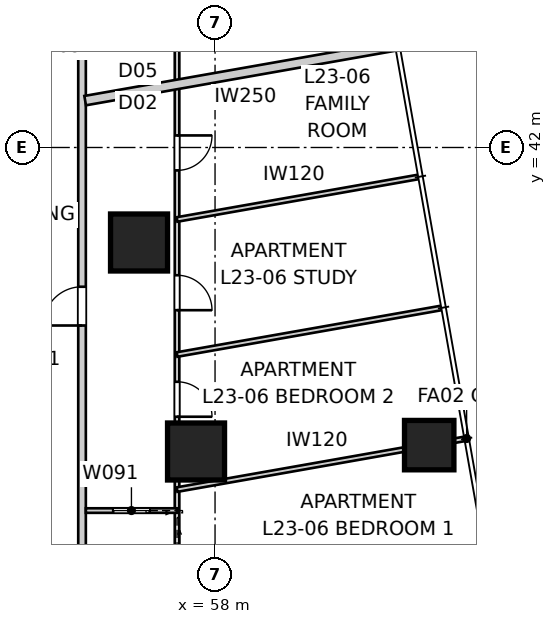
"""IFC4 building model, lengths in metres.
Left out: names, types, materials, properties, quantities, classifications, styles, units other than length and angle.
Written with IfcOpenShell. Run it as: python <this file> out.ifc"""

import sys

from ifc_helpers import new_model, si_unit, direction, frame, frame_2d, origin, origin_2d, place, context, subcontext, project, spatial, rectangle, extrude, element, fill, save


model = new_model("IFC4")
c1 = context("Model", 3, precision=1e-05, world=origin(), true_north=direction((0.0, 1.0)))
c2 = subcontext(c1, "Body", "Model", "MODEL_VIEW")
j1 = project(units=[si_unit("LENGTHUNIT", "METRE"), si_unit("PLANEANGLEUNIT", "RADIAN")], contexts=[c1])
p1 = place(None, origin())
s1 = spatial("IfcSite", under=j1, at=p1, CompositionType="ELEMENT")
p2 = place(p1, origin())
s2 = spatial("IfcBuilding", under=s1, at=p2, CompositionType="ELEMENT")
p3 = place(p2, frame((0.0, 0.0, 86.2)))
s3 = spatial("IfcBuildingStorey", under=s2, at=p3, CompositionType="ELEMENT", Elevation=86.2)
p4 = place(p3, frame((63.635, 34.167, 0.0), z_axis=(0.0, 0.0, 1.0), x_axis=(1.0, 0.0, 0.0)))
e1 = element("IfcColumn", 1, at=p4, inside=s3, PredefinedType="COLUMN", context=c2, shape_type="SweptSolid", body=[
    extrude(rectangle(XDim=1.3, YDim=1.3, at=origin_2d()), origin(), (0.0, 0.0, 1.0), 3.4),
])
for number, where, z_axis, x_axis in (
    (2, (57.5, 34.0, 0.0), (0.0, 0.0, 1.0), (1.0, 0.0, 0.0)),
    (3, (56.0, 39.5, 0.0), (0.0, 0.0, 1.0), (1.0, 0.0, 0.0)),
):
    element("IfcColumn", number, at=place(p3, frame(where, z_axis=z_axis, x_axis=x_axis)), inside=s3, PredefinedType="COLUMN", context=c2, shape_type="SweptSolid", body=[
        extrude(rectangle(XDim=1.5, YDim=1.5, at=origin_2d()), origin(), (0.0, 0.0, 1.0), 3.4),
    ])
p5 = place(p3, frame((54.5, 15.5, 0.0), z_axis=(0.0, 0.0, 1.0), x_axis=(0.0, 1.0, 0.0)))
e4 = element("IfcWall", 4, at=p5, inside=s3, PredefinedType="PARTITIONING", context=c2, shape_type="SweptSolid", body=[
    extrude(rectangle(XDim=29.0, YDim=0.2, at=frame_2d((14.5, 0.0))), origin(), (0.0, 0.0, 1.0), 3.25),
])
p6 = place(p5, frame((21.815, 0.0, 0.0)))
e5 = element("IfcOpeningElement", 5, at=p6, cuts=e4, PredefinedType="OPENING", context=c2, shape_type="SweptSolid", body=[
    extrude(rectangle(XDim=1.02, YDim=2.34, at=frame_2d((0.51, 1.17))), frame((0.0, 0.11, 0.0), z_axis=(0.0, -1.0, 0.0), x_axis=(1.0, 0.0, 0.0)), (0.0, 0.0, 1.0), 0.22),
])
p7 = place(p5, frame((2.855, 0.0, 0.0)))
e6 = element("IfcOpeningElement", 6, at=p7, cuts=e4, PredefinedType="OPENING", context=c2, shape_type="SweptSolid", body=[
    extrude(rectangle(XDim=1.02, YDim=2.1, at=frame_2d((0.51, 1.05))), frame((0.0, 0.11, 0.0), z_axis=(0.0, -1.0, 0.0), x_axis=(1.0, 0.0, 0.0)), (0.0, 0.0, 1.0), 0.22),
])
p8 = place(p3, frame((54.5, 44.5, 0.0), z_axis=(0.0, 0.0, 1.0), x_axis=(-1.0, 0.0, 0.0)))
e7 = element("IfcWall", 7, at=p8, inside=s3, PredefinedType="PARTITIONING", context=c2, shape_type="SweptSolid", body=[
    extrude(rectangle(XDim=29.0, YDim=0.2, at=frame_2d((14.5, 0.0))), origin(), (0.0, 0.0, 1.0), 3.25),
])
p9 = place(p8, frame((10.129, 0.0, 0.0)))
e8 = element("IfcOpeningElement", 8, at=p9, cuts=e7, PredefinedType="OPENING", context=c2, shape_type="SweptSolid", body=[
    extrude(rectangle(XDim=1.02, YDim=2.34, at=frame_2d((0.51, 1.17))), frame((0.0, 0.11, 0.0), z_axis=(0.0, -1.0, 0.0), x_axis=(1.0, 0.0, 0.0)), (0.0, 0.0, 1.0), 0.22),
])
p10 = place(p8, frame((3.065, 0.0, 0.0)))
e9 = element("IfcOpeningElement", 9, at=p10, cuts=e7, PredefinedType="OPENING", context=c2, shape_type="SweptSolid", body=[
    extrude(rectangle(XDim=1.02, YDim=2.1, at=frame_2d((0.51, 1.05))), frame((0.0, 0.11, 0.0), z_axis=(0.0, -1.0, 0.0), x_axis=(1.0, 0.0, 0.0)), (0.0, 0.0, 1.0), 0.22),
])
p11 = place(p3, frame((62.797, 44.682, 0.0), z_axis=(0.0, 0.0, 1.0), x_axis=(-0.984807121942, -0.173651756605, 0.0)))
e10 = element("IfcWall", 10, at=p11, inside=s3, PredefinedType="PARTITIONING", context=c2, shape_type="SweptSolid", body=[
    extrude(rectangle(XDim=8.341, YDim=0.25, at=frame_2d((4.171, 0.0))), origin(), (0.0, 0.0, 1.0), 3.25),
])
p12 = place(p3, frame((57.0, 47.0, 0.0), z_axis=(0.0, 0.0, 1.0), x_axis=(0.0, -1.0, 0.0)))
e11 = element("IfcWall", 11, at=p12, inside=s3, PredefinedType="PARTITIONING", context=c2, shape_type="SweptSolid", body=[
    extrude(rectangle(XDim=34.0, YDim=0.12, at=frame_2d((17.0, 0.0))), origin(), (0.0, 0.0, 1.0), 2.55),
])
p13 = place(p12, frame((8.361, 0.0, 0.0)))
e12 = element("IfcOpeningElement", 12, at=p13, cuts=e11, PredefinedType="OPENING", context=c2, shape_type="SweptSolid", body=[
    extrude(rectangle(XDim=0.92, YDim=2.34, at=frame_2d((0.46, 1.17))), frame((0.0, 0.07, 0.0), z_axis=(0.0, -1.0, 0.0), x_axis=(1.0, 0.0, 0.0)), (0.0, 0.0, 1.0), 0.14),
])
p14 = place(p12, frame((11.166, 0.0, 0.0)))
e13 = element("IfcOpeningElement", 13, at=p14, cuts=e11, PredefinedType="OPENING", context=c2, shape_type="SweptSolid", body=[
    extrude(rectangle(XDim=0.92, YDim=2.34, at=frame_2d((0.46, 1.17))), frame((0.0, 0.07, 0.0), z_axis=(0.0, -1.0, 0.0), x_axis=(1.0, 0.0, 0.0)), (0.0, 0.0, 1.0), 0.14),
])
p15 = place(p12, frame((4.683, 0.0, 0.0)))
e14 = element("IfcOpeningElement", 14, at=p15, cuts=e11, PredefinedType="OPENING", context=c2, shape_type="SweptSolid", body=[
    extrude(rectangle(XDim=0.92, YDim=2.34, at=frame_2d((0.46, 1.17))), frame((0.0, 0.07, 0.0), z_axis=(0.0, -1.0, 0.0), x_axis=(1.0, 0.0, 0.0)), (0.0, 0.0, 1.0), 0.14),
])
p16 = place(p12, frame((27.784, 0.0, 0.0)))
e15 = element("IfcOpeningElement", 15, at=p16, cuts=e11, PredefinedType="OPENING", context=c2, shape_type="SweptSolid", body=[
    extrude(rectangle(XDim=0.92, YDim=2.34, at=frame_2d((0.46, 1.17))), frame((0.0, 0.07, 0.0), z_axis=(0.0, -1.0, 0.0), x_axis=(1.0, 0.0, 0.0)), (0.0, 0.0, 1.0), 0.14),
])
p17 = place(p12, frame((31.939, 0.0, 0.0)))
e16 = element("IfcOpeningElement", 16, at=p17, cuts=e11, PredefinedType="OPENING", context=c2, shape_type="SweptSolid", body=[
    extrude(rectangle(XDim=0.92, YDim=2.34, at=frame_2d((0.46, 1.17))), frame((0.0, 0.07, 0.0), z_axis=(0.0, -1.0, 0.0), x_axis=(1.0, 0.0, 0.0)), (0.0, 0.0, 1.0), 0.14),
])
p18 = place(p12, frame((15.601, 0.0, 0.0)))
e17 = element("IfcOpeningElement", 17, at=p18, cuts=e11, PredefinedType="OPENING", context=c2, shape_type="SweptSolid", body=[
    extrude(rectangle(XDim=0.96, YDim=2.1, at=frame_2d((0.48, 1.05))), frame((0.0, 0.07, 0.0), z_axis=(0.0, -1.0, 0.0), x_axis=(1.0, 0.0, 0.0)), (0.0, 0.0, 1.0), 0.14),
])
p19 = place(p12, frame((18.21, 0.0, 0.0)))
e18 = element("IfcOpeningElement", 18, at=p19, cuts=e11, PredefinedType="OPENING", context=c2, shape_type="SweptSolid", body=[
    extrude(rectangle(XDim=0.96, YDim=2.1, at=frame_2d((0.48, 1.05))), frame((0.0, 0.07, 0.0), z_axis=(0.0, -1.0, 0.0), x_axis=(1.0, 0.0, 0.0)), (0.0, 0.0, 1.0), 0.14),
])
p20 = place(p12, frame((1.19, 0.0, 0.0)))
e19 = element("IfcOpeningElement", 19, at=p20, cuts=e11, PredefinedType="OPENING", context=c2, shape_type="SweptSolid", body=[
    extrude(rectangle(XDim=0.96, YDim=2.1, at=frame_2d((0.48, 1.05))), frame((0.0, 0.07, 0.0), z_axis=(0.0, -1.0, 0.0), x_axis=(1.0, 0.0, 0.0)), (0.0, 0.0, 1.0), 0.14),
])
p21 = place(p3, frame((57.0, 32.446, 0.0), z_axis=(0.0, 0.0, 1.0), x_axis=(-1.0, 0.0, 0.0)))
e20 = element("IfcWall", 20, at=p21, inside=s3, PredefinedType="PARTITIONING", context=c2, shape_type="SweptSolid", body=[
    extrude(rectangle(XDim=2.4, YDim=0.12, at=frame_2d((1.2, 0.0))), origin(), (0.0, 0.0, 1.0), 3.25),
])
p22 = place(p21, frame((0.72, 0.0, 0.0)))
e21 = element("IfcOpeningElement", 21, at=p22, cuts=e20, PredefinedType="OPENING", context=c2, shape_type="SweptSolid", body=[
    extrude(rectangle(XDim=0.96, YDim=2.1, at=frame_2d((0.48, 1.05))), frame((0.0, 0.07, 0.0), z_axis=(0.0, -1.0, 0.0), x_axis=(1.0, 0.0, 0.0)), (0.0, 0.0, 1.0), 0.14),
])
p23 = place(p3, frame((57.0, 32.998, 0.0), z_axis=(0.0, 0.0, 1.0), x_axis=(0.984808453088, 0.173644207293, 0.0)))
e22 = element("IfcWall", 22, at=p23, inside=s3, PredefinedType="PARTITIONING", context=c2, shape_type="SweptSolid", body=[
    extrude(rectangle(XDim=7.698, YDim=0.12, at=frame_2d((3.849, 0.0))), origin(), (0.0, 0.0, 1.0), 3.25),
])
p24 = place(p3, frame((57.0, 36.552, 0.0), z_axis=(0.0, 0.0, 1.0), x_axis=(0.984809234282, 0.173639776761, 0.0)))
e23 = element("IfcWall", 23, at=p24, inside=s3, PredefinedType="PARTITIONING", context=c2, shape_type="SweptSolid", body=[
    extrude(rectangle(XDim=7.081, YDim=0.12, at=frame_2d((3.541, 0.0))), origin(), (0.0, 0.0, 1.0), 3.25),
])
p25 = place(p3, frame((57.0, 40.105, 0.0), z_axis=(0.0, 0.0, 1.0), x_axis=(0.984809025774, 0.173640959323, 0.0)))
e24 = element("IfcWall", 24, at=p25, inside=s3, PredefinedType="PARTITIONING", context=c2, shape_type="SweptSolid", body=[
    extrude(rectangle(XDim=6.463, YDim=0.12, at=frame_2d((3.232, 0.0))), origin(), (0.0, 0.0, 1.0), 3.25),
])
p26 = place(p6, origin())
e25 = element("IfcDoor", 25, at=p26, inside=s3, OperationType="SINGLE_SWING_LEFT", PredefinedType="DOOR", context=c2, shape_type="SweptSolid", body=[
    extrude(rectangle(XDim=1.02, YDim=2.34, at=frame_2d((0.51, 1.17))), frame((0.0, 0.025, 0.0), z_axis=(0.0, -1.0, 0.0), x_axis=(1.0, 0.0, 0.0)), (0.0, 0.0, 1.0), 0.05),
])
fill(e5, e25)
p27 = place(p13, origin())
e26 = element("IfcDoor", 26, at=p27, inside=s3, OperationType="SINGLE_SWING_RIGHT", PredefinedType="DOOR", context=c2, shape_type="SweptSolid", body=[
    extrude(rectangle(XDim=0.92, YDim=2.34, at=frame_2d((0.46, 1.17))), frame((0.0, 0.025, 0.0), z_axis=(0.0, -1.0, 0.0), x_axis=(1.0, 0.0, 0.0)), (0.0, 0.0, 1.0), 0.05),
])
fill(e12, e26)
p28 = place(p14, origin())
e27 = element("IfcDoor", 27, at=p28, inside=s3, OperationType="SINGLE_SWING_RIGHT", PredefinedType="DOOR", context=c2, shape_type="SweptSolid", body=[
    extrude(rectangle(XDim=0.92, YDim=2.34, at=frame_2d((0.46, 1.17))), frame((0.0, 0.025, 0.0), z_axis=(0.0, -1.0, 0.0), x_axis=(1.0, 0.0, 0.0)), (0.0, 0.0, 1.0), 0.05),
])
fill(e13, e27)
p29 = place(p15, origin())
e28 = element("IfcDoor", 28, at=p29, inside=s3, OperationType="SINGLE_SWING_LEFT", PredefinedType="DOOR", context=c2, shape_type="SweptSolid", body=[
    extrude(rectangle(XDim=0.92, YDim=2.34, at=frame_2d((0.46, 1.17))), frame((0.0, 0.025, 0.0), z_axis=(0.0, -1.0, 0.0), x_axis=(1.0, 0.0, 0.0)), (0.0, 0.0, 1.0), 0.05),
])
fill(e14, e28)
p30 = place(p22, origin())
e29 = element("IfcDoor", 29, at=p30, inside=s3, OperationType="SLIDING_TO_LEFT", PredefinedType="DOOR", context=c2, shape_type="SweptSolid", body=[
    extrude(rectangle(XDim=0.96, YDim=2.1, at=frame_2d((0.48, 1.05))), frame((0.0, 0.025, 0.0), z_axis=(0.0, -1.0, 0.0), x_axis=(1.0, 0.0, 0.0)), (0.0, 0.0, 1.0), 0.05),
])
fill(e21, e29)
save(model, sys.argv[1])
